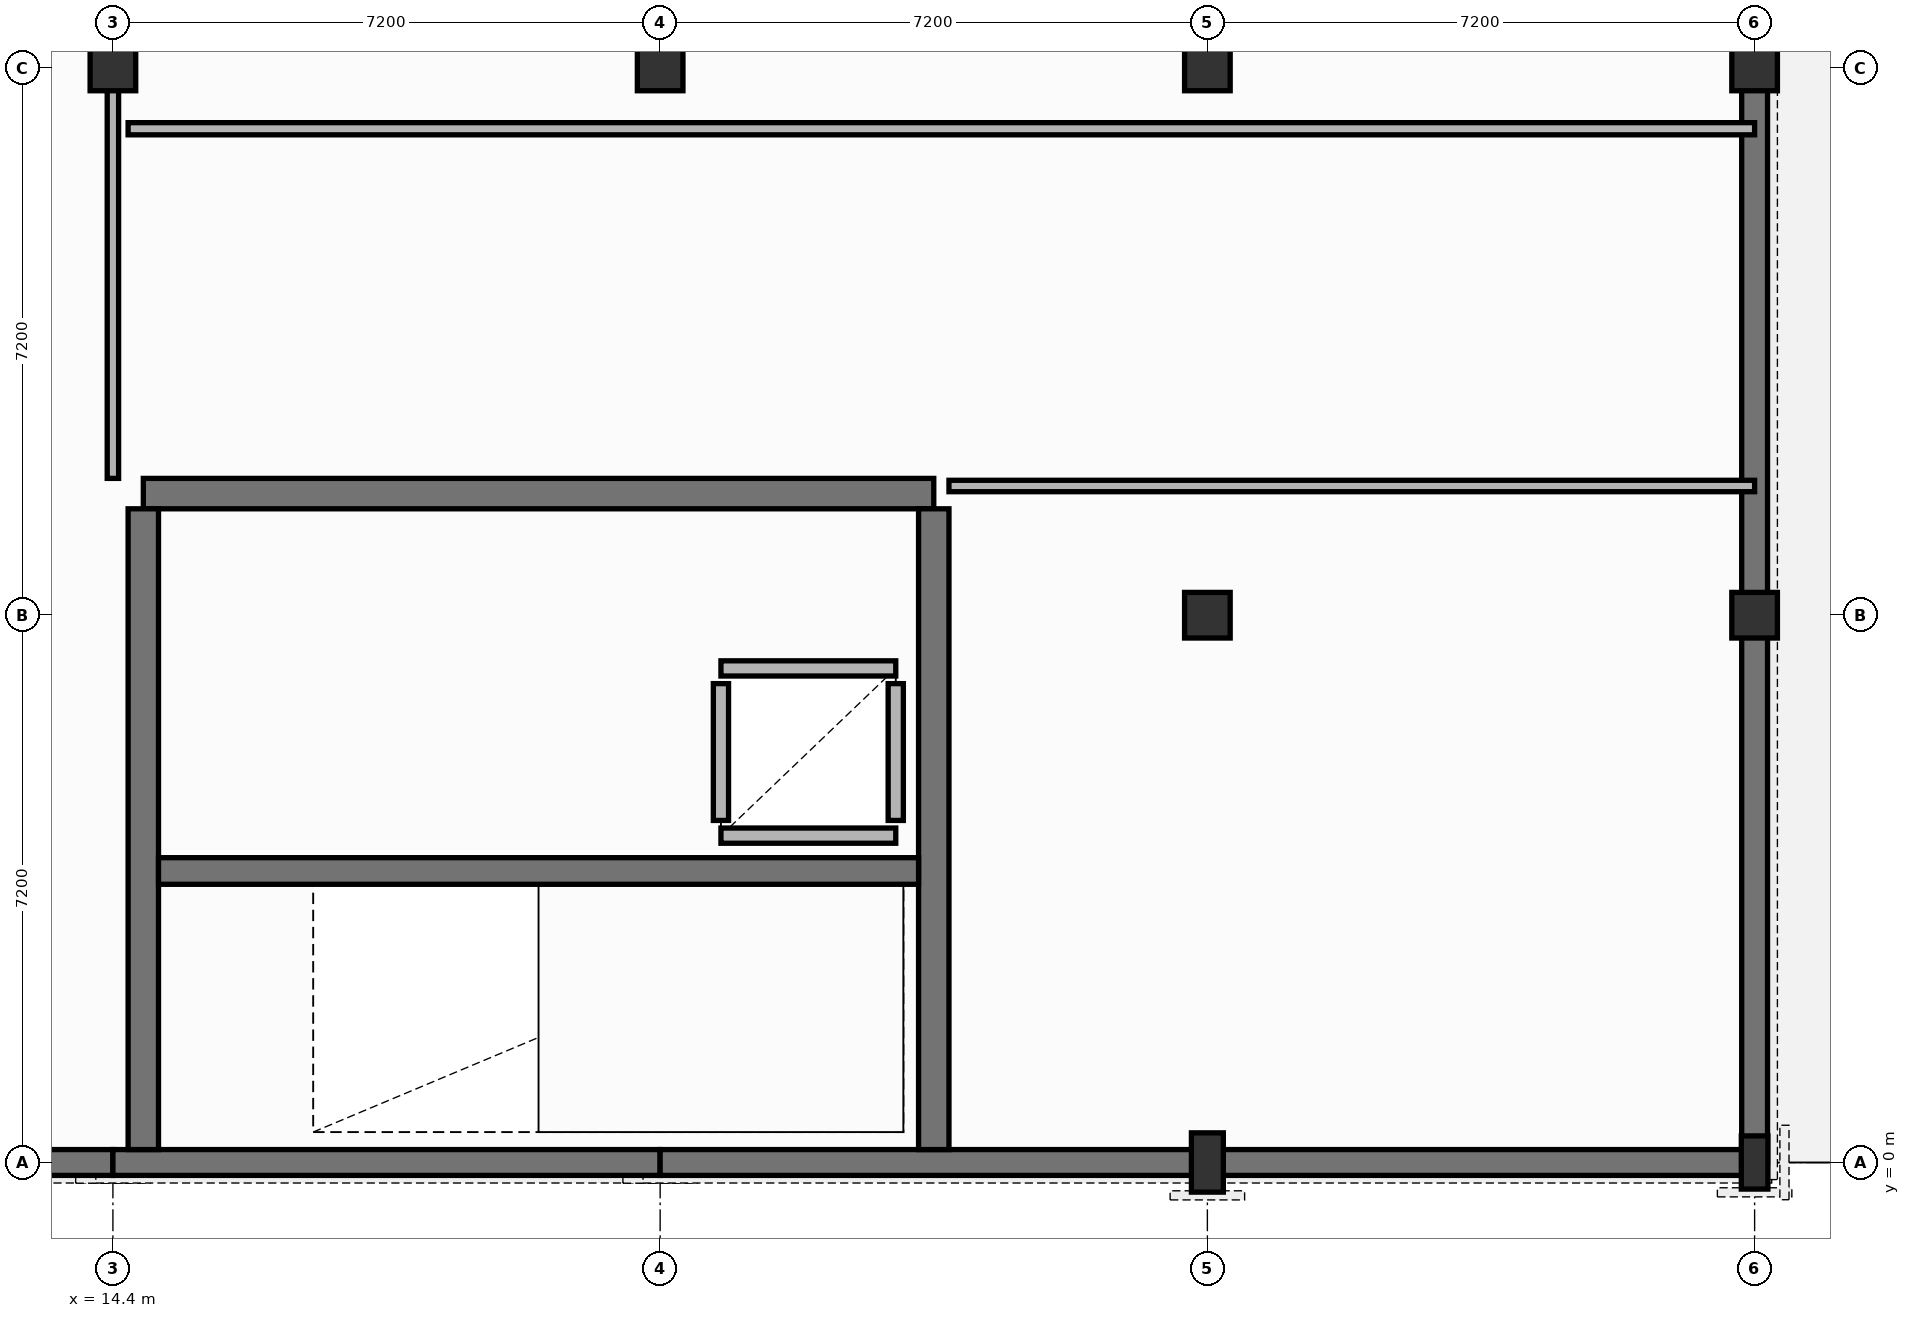
"""IFC4 building model, lengths in metres.
Left out: names, types, materials, properties, quantities, classifications, styles, units other than length and angle.
Written with IfcOpenShell. Run it as: python <this file> out.ifc"""

import sys

from ifc_helpers import new_model, si_unit, direction, frame, frame_2d, origin, origin_2d, place, context, subcontext, project, spatial, rectangle, extrude, element, fill, save


model = new_model("IFC4")
c1 = context("Model", 3, precision=1e-05, world=origin(), true_north=direction((0.0, 1.0)))
c2 = subcontext(c1, "Body", "Model", "MODEL_VIEW")
j1 = project(units=[si_unit("LENGTHUNIT", "METRE"), si_unit("PLANEANGLEUNIT", "RADIAN")], contexts=[c1])
p1 = place(None, origin())
s1 = spatial("IfcSite", under=j1, at=p1, CompositionType="ELEMENT")
p2 = place(p1, origin())
s2 = spatial("IfcBuilding", under=s1, at=p2, CompositionType="ELEMENT")
p3 = place(p2, frame((0.0, 0.0, 8.94)))
s3 = spatial("IfcBuildingStorey", under=s2, at=p3, CompositionType="ELEMENT", Elevation=8.94)
for number, where, z_axis, x_axis in (
    (1, (14.4, 14.4, 0.0), (0.0, 0.0, 1.0), (1.0, 0.0, 0.0)),
    (2, (21.6, 14.4, 0.0), (0.0, 0.0, 1.0), (1.0, 0.0, 0.0)),
):
    element("IfcColumn", number, at=place(p3, frame(where, z_axis=z_axis, x_axis=x_axis)), inside=s3, PredefinedType="COLUMN", context=c2, shape_type="SweptSolid", body=[
        extrude(rectangle(XDim=0.6, YDim=0.6, at=origin_2d()), origin(), (0.0, 0.0, 1.0), 3.84),
    ])
p4 = place(p3, frame((28.8, 0.0, 0.0), z_axis=(0.0, 0.0, 1.0), x_axis=(0.0, 1.0, 0.0)))
e3 = element("IfcColumn", 3, at=p4, inside=s3, PredefinedType="PILASTER", context=c2, shape_type="SweptSolid", body=[
    extrude(rectangle(XDim=0.42, YDim=0.78, at=origin_2d()), origin(), (0.0, 0.0, 1.0), 3.84),
])
for number, where, z_axis, x_axis in (
    (4, (28.8, 7.2, 0.0), (0.0, 0.0, 1.0), (1.0, 0.0, 0.0)),
    (5, (28.8, 14.4, 0.0), (0.0, 0.0, 1.0), (1.0, 0.0, 0.0)),
):
    element("IfcColumn", number, at=place(p3, frame(where, z_axis=z_axis, x_axis=x_axis)), inside=s3, PredefinedType="COLUMN", context=c2, shape_type="SweptSolid", body=[
        extrude(rectangle(XDim=0.6, YDim=0.6, at=origin_2d()), origin(), (0.0, 0.0, 1.0), 3.84),
    ])
p5 = place(p3, frame((36.0, 0.0, 0.0), z_axis=(0.0, 0.0, 1.0), x_axis=(0.0, 1.0, 0.0)))
e6 = element("IfcColumn", 6, at=p5, inside=s3, PredefinedType="PILASTER", context=c2, shape_type="SweptSolid", body=[
    extrude(rectangle(XDim=0.35, YDim=0.7, at=origin_2d()), origin(), (0.0, 0.0, 1.0), 3.84),
])
for number, where, z_axis, x_axis in (
    (7, (36.0, 7.2, 0.0), (0.0, 0.0, 1.0), (1.0, 0.0, 0.0)),
    (8, (36.0, 14.4, 0.0), (0.0, 0.0, 1.0), (1.0, 0.0, 0.0)),
):
    element("IfcColumn", number, at=place(p3, frame(where, z_axis=z_axis, x_axis=x_axis)), inside=s3, PredefinedType="COLUMN", context=c2, shape_type="SweptSolid", body=[
        extrude(rectangle(XDim=0.6, YDim=0.6, at=origin_2d()), origin(), (0.0, 0.0, 1.0), 3.84),
    ])
p6 = place(p3, frame((7.2, 0.0, 0.0), z_axis=(0.0, 0.0, 1.0), x_axis=(1.0, 0.0, 0.0)))
e9 = element("IfcWall", 9, at=p6, inside=s3, PredefinedType="SOLIDWALL", context=c2, shape_type="SweptSolid", body=[
    extrude(rectangle(XDim=7.2, YDim=0.34, at=frame_2d((3.6, 0.0))), origin(), (0.0, 0.0, 1.0), 3.53),
])
p7 = place(p6, frame((2.0, 0.0, 0.85)))
e10 = element("IfcOpeningElement", 10, at=p7, cuts=e9, PredefinedType="OPENING", context=c2, shape_type="SweptSolid", body=[
    extrude(rectangle(XDim=2.4, YDim=2.4, at=frame_2d((1.2, 1.2))), frame((0.0, 0.18, 0.0), z_axis=(0.0, -1.0, 0.0), x_axis=(1.0, 0.0, 0.0)), (0.0, 0.0, 1.0), 0.36),
])
p8 = place(p3, frame((14.4, 0.0, 0.0), z_axis=(0.0, 0.0, 1.0), x_axis=(1.0, 0.0, 0.0)))
e11 = element("IfcWall", 11, at=p8, inside=s3, PredefinedType="SOLIDWALL", context=c2, shape_type="SweptSolid", body=[
    extrude(rectangle(XDim=7.2, YDim=0.34, at=frame_2d((3.6, 0.0))), origin(), (0.0, 0.0, 1.0), 3.53),
])
p9 = place(p8, frame((5.2, 0.0, 1.05)))
e12 = element("IfcOpeningElement", 12, at=p9, cuts=e11, PredefinedType="OPENING", context=c2, shape_type="SweptSolid", body=[
    extrude(rectangle(XDim=1.05, YDim=1.75, at=frame_2d((0.525, 0.875))), frame((0.0, 0.18, 0.0), z_axis=(0.0, -1.0, 0.0), x_axis=(1.0, 0.0, 0.0)), (0.0, 0.0, 1.0), 0.36),
])
p10 = place(p3, frame((21.6, 0.0, 0.0), z_axis=(0.0, 0.0, 1.0), x_axis=(1.0, 0.0, 0.0)))
e13 = element("IfcWall", 13, at=p10, inside=s3, PredefinedType="SOLIDWALL", context=c2, shape_type="SweptSolid", body=[
    extrude(rectangle(XDim=7.2, YDim=0.34, at=frame_2d((3.6, 0.0))), origin(), (0.0, 0.0, 1.0), 3.53),
])
p11 = place(p10, frame((5.2, 0.0, 1.05)))
e14 = element("IfcOpeningElement", 14, at=p11, cuts=e13, PredefinedType="OPENING", context=c2, shape_type="SweptSolid", body=[
    extrude(rectangle(XDim=1.05, YDim=1.75, at=frame_2d((0.525, 0.875))), frame((0.0, 0.18, 0.0), z_axis=(0.0, -1.0, 0.0), x_axis=(1.0, 0.0, 0.0)), (0.0, 0.0, 1.0), 0.36),
])
p12 = place(p3, frame((28.8, 0.0, 0.0), z_axis=(0.0, 0.0, 1.0), x_axis=(1.0, 0.0, 0.0)))
e15 = element("IfcWall", 15, at=p12, inside=s3, PredefinedType="SOLIDWALL", context=c2, shape_type="SweptSolid", body=[
    extrude(rectangle(XDim=7.2, YDim=0.34, at=frame_2d((3.6, 0.0))), origin(), (0.0, 0.0, 1.0), 3.53),
])
p13 = place(p12, frame((2.0, 0.0, 0.355)))
e16 = element("IfcOpeningElement", 16, at=p13, cuts=e15, PredefinedType="OPENING", context=c2, shape_type="SweptSolid", body=[
    extrude(rectangle(XDim=2.4, YDim=2.4, at=frame_2d((1.2, 1.2))), frame((0.0, 0.18, 0.0), z_axis=(0.0, -1.0, 0.0), x_axis=(1.0, 0.0, 0.0)), (0.0, 0.0, 1.0), 0.36),
])
p14 = place(p3, frame((36.0, 0.0, 0.0), z_axis=(0.0, 0.0, 1.0), x_axis=(0.0, 1.0, 0.0)))
e17 = element("IfcWall", 17, at=p14, inside=s3, PredefinedType="SOLIDWALL", context=c2, shape_type="SweptSolid", body=[
    extrude(rectangle(XDim=21.6, YDim=0.34, at=frame_2d((10.8, 0.0))), origin(), (0.0, 0.0, 1.0), 3.53),
])
p15 = place(p14, frame((10.2, 0.0, 0.0)))
e18 = element("IfcOpeningElement", 18, at=p15, cuts=e17, PredefinedType="OPENING", context=c2, shape_type="SweptSolid", body=[
    extrude(rectangle(XDim=1.05, YDim=2.2, at=frame_2d((0.525, 1.1))), frame((0.0, 0.18, 0.0), z_axis=(0.0, -1.0, 0.0), x_axis=(1.0, 0.0, 0.0)), (0.0, 0.0, 1.0), 0.36),
])
p16 = place(p14, frame((2.8, 0.0, 0.9)))
e19 = element("IfcOpeningElement", 19, at=p16, cuts=e17, PredefinedType="OPENING", context=c2, shape_type="SweptSolid", body=[
    extrude(rectangle(XDim=2.3, YDim=1.7, at=frame_2d((1.15, 0.85))), frame((0.0, 0.18, 0.0), z_axis=(0.0, -1.0, 0.0), x_axis=(1.0, 0.0, 0.0)), (0.0, 0.0, 1.0), 0.36),
])
p17 = place(p14, frame((15.2, 0.0, 0.705)))
e20 = element("IfcOpeningElement", 20, at=p17, cuts=e17, PredefinedType="OPENING", context=c2, shape_type="SweptSolid", body=[
    extrude(rectangle(XDim=1.6, YDim=2.05, at=frame_2d((0.8, 1.025))), frame((0.0, 0.18, 0.0), z_axis=(0.0, -1.0, 0.0), x_axis=(1.0, 0.0, 0.0)), (0.0, 0.0, 1.0), 0.36),
])
p18 = place(p3, frame((14.8, 8.8, 0.0), z_axis=(0.0, 0.0, 1.0), x_axis=(1.0, 0.0, 0.0)))
e21 = element("IfcWall", 21, at=p18, inside=s3, PredefinedType="SHEAR", context=c2, shape_type="SweptSolid", body=[
    extrude(rectangle(XDim=10.4, YDim=0.4, at=frame_2d((5.2, 0.0))), origin(), (0.0, 0.0, 1.0), 3.53),
])
p19 = place(p18, frame((2.4, 0.0, 0.0)))
e22 = element("IfcOpeningElement", 22, at=p19, cuts=e21, PredefinedType="OPENING", context=c2, shape_type="SweptSolid", body=[
    extrude(rectangle(XDim=1.5, YDim=2.2, at=frame_2d((0.75, 1.1))), frame((0.0, 0.21, 0.0), z_axis=(0.0, -1.0, 0.0), x_axis=(1.0, 0.0, 0.0)), (0.0, 0.0, 1.0), 0.42),
])
for number, where, z_axis, x_axis in (
    (23, (14.8, 0.17, 0.0), (0.0, 0.0, 1.0), (0.0, 1.0, 0.0)),
    (24, (25.2, 0.17, 0.0), (0.0, 0.0, 1.0), (0.0, 1.0, 0.0)),
):
    element("IfcWall", number, at=place(p3, frame(where, z_axis=z_axis, x_axis=x_axis)), inside=s3, PredefinedType="SHEAR", context=c2, shape_type="SweptSolid", body=[
        extrude(rectangle(XDim=8.43, YDim=0.4, at=frame_2d((4.215, 0.0))), origin(), (0.0, 0.0, 1.0), 3.53),
    ])
p20 = place(p3, frame((15.0, 3.835, 0.0), z_axis=(0.0, 0.0, 1.0), x_axis=(1.0, 0.0, 0.0)))
e25 = element("IfcWall", 25, at=p20, inside=s3, PredefinedType="SHEAR", context=c2, shape_type="SweptSolid", body=[
    extrude(rectangle(XDim=10.0, YDim=0.35, at=frame_2d((5.0, 0.0))), origin(), (0.0, 0.0, 1.0), 3.53),
])
p21 = place(p20, frame((0.45, 0.0, 0.0)))
e26 = element("IfcOpeningElement", 26, at=p21, cuts=e25, PredefinedType="OPENING", context=c2, shape_type="SweptSolid", body=[
    extrude(rectangle(XDim=1.05, YDim=2.2, at=frame_2d((0.525, 1.1))), frame((0.0, 0.185, 0.0), z_axis=(0.0, -1.0, 0.0), x_axis=(1.0, 0.0, 0.0)), (0.0, 0.0, 1.0), 0.37),
])
for number, where, z_axis, x_axis in (
    (27, (22.4, 4.3, 0.0), (0.0, 0.0, 1.0), (1.0, 0.0, 0.0)),
    (28, (22.4, 6.5, 0.0), (0.0, 0.0, 1.0), (1.0, 0.0, 0.0)),
):
    element("IfcWall", number, at=place(p3, frame(where, z_axis=z_axis, x_axis=x_axis)), inside=s3, PredefinedType="PARTITIONING", context=c2, shape_type="SweptSolid", body=[
        extrude(rectangle(XDim=2.3, YDim=0.2, at=frame_2d((1.15, 0.0))), origin(), (0.0, 0.0, 1.0), 3.53),
    ])
p22 = place(p3, frame((22.4, 4.5, 0.0), z_axis=(0.0, 0.0, 1.0), x_axis=(0.0, 1.0, 0.0)))
e29 = element("IfcWall", 29, at=p22, inside=s3, PredefinedType="PARTITIONING", context=c2, shape_type="SweptSolid", body=[
    extrude(rectangle(XDim=1.8, YDim=0.2, at=frame_2d((0.9, 0.0))), origin(), (0.0, 0.0, 1.0), 3.53),
])
p23 = place(p22, frame((0.45, 0.0, 0.0)))
e30 = element("IfcOpeningElement", 30, at=p23, cuts=e29, PredefinedType="OPENING", context=c2, shape_type="SweptSolid", body=[
    extrude(rectangle(XDim=0.9, YDim=2.1, at=frame_2d((0.45, 1.05))), frame((0.0, 0.11, 0.0), z_axis=(0.0, -1.0, 0.0), x_axis=(1.0, 0.0, 0.0)), (0.0, 0.0, 1.0), 0.22),
])
p24 = place(p3, frame((24.7, 4.5, 0.0), z_axis=(0.0, 0.0, 1.0), x_axis=(0.0, 1.0, 0.0)))
e31 = element("IfcWall", 31, at=p24, inside=s3, PredefinedType="PARTITIONING", context=c2, shape_type="SweptSolid", body=[
    extrude(rectangle(XDim=1.8, YDim=0.2, at=frame_2d((0.9, 0.0))), origin(), (0.0, 0.0, 1.0), 3.53),
])
p25 = place(p3, frame((14.4, 9.0, 0.0), z_axis=(0.0, 0.0, 1.0), x_axis=(0.0, 1.0, 0.0)))
e32 = element("IfcWall", 32, at=p25, inside=s3, PredefinedType="PARTITIONING", context=c2, shape_type="SweptSolid", body=[
    extrude(rectangle(XDim=12.6, YDim=0.15, at=frame_2d((6.3, 0.0))), origin(), (0.0, 0.0, 1.0), 2.755),
])
p26 = place(p25, frame((8.2, 0.0, 0.0)))
e33 = element("IfcOpeningElement", 33, at=p26, cuts=e32, PredefinedType="OPENING", context=c2, shape_type="SweptSolid", body=[
    extrude(rectangle(XDim=1.6, YDim=2.2, at=frame_2d((0.8, 1.1))), frame((0.0, 0.085, 0.0), z_axis=(0.0, -1.0, 0.0), x_axis=(1.0, 0.0, 0.0)), (0.0, 0.0, 1.0), 0.17),
])
p27 = place(p3, frame((14.6, 13.6, 0.0), z_axis=(0.0, 0.0, 1.0), x_axis=(1.0, 0.0, 0.0)))
e34 = element("IfcWall", 34, at=p27, inside=s3, PredefinedType="PARTITIONING", context=c2, shape_type="SweptSolid", body=[
    extrude(rectangle(XDim=21.4, YDim=0.16, at=frame_2d((10.7, 0.0))), origin(), (0.0, 0.0, 1.0), 3.53),
])
p28 = place(p27, frame((2.8, 0.0, 0.0)))
e35 = element("IfcOpeningElement", 35, at=p28, cuts=e34, PredefinedType="OPENING", context=c2, shape_type="SweptSolid", body=[
    extrude(rectangle(XDim=1.6, YDim=2.2, at=frame_2d((0.8, 1.1))), frame((0.0, 0.09, 0.0), z_axis=(0.0, -1.0, 0.0), x_axis=(1.0, 0.0, 0.0)), (0.0, 0.0, 1.0), 0.18),
])
p29 = place(p3, frame((25.4, 8.9, 0.0), z_axis=(0.0, 0.0, 1.0), x_axis=(1.0, 0.0, 0.0)))
e36 = element("IfcWall", 36, at=p29, inside=s3, PredefinedType="PARTITIONING", context=c2, shape_type="SweptSolid", body=[
    extrude(rectangle(XDim=10.6, YDim=0.15, at=frame_2d((5.3, 0.0))), origin(), (0.0, 0.0, 1.0), 3.53),
])
p30 = place(p29, frame((4.2, 0.0, 0.0)))
e37 = element("IfcOpeningElement", 37, at=p30, cuts=e36, PredefinedType="OPENING", context=c2, shape_type="SweptSolid", body=[
    extrude(rectangle(XDim=1.0, YDim=2.15, at=frame_2d((0.5, 1.075))), frame((0.0, 0.085, 0.0), z_axis=(0.0, -1.0, 0.0), x_axis=(1.0, 0.0, 0.0)), (0.0, 0.0, 1.0), 0.17),
])
p31 = place(p9, origin())
e38 = element("IfcWindow", 38, at=p31, inside=s3, PartitioningType="SINGLE_PANEL", PredefinedType="WINDOW", context=c2, shape_type="SweptSolid", body=[
    extrude(rectangle(XDim=1.05, YDim=1.75, at=frame_2d((0.525, 0.875))), frame((0.0, 0.03, 0.0), z_axis=(0.0, -1.0, 0.0), x_axis=(1.0, 0.0, 0.0)), (0.0, 0.0, 1.0), 0.06),
])
fill(e12, e38)
p32 = place(p11, origin())
e39 = element("IfcWindow", 39, at=p32, inside=s3, PartitioningType="SINGLE_PANEL", PredefinedType="WINDOW", context=c2, shape_type="SweptSolid", body=[
    extrude(rectangle(XDim=1.05, YDim=1.75, at=frame_2d((0.525, 0.875))), frame((0.0, 0.03, 0.0), z_axis=(0.0, -1.0, 0.0), x_axis=(1.0, 0.0, 0.0)), (0.0, 0.0, 1.0), 0.06),
])
fill(e14, e39)
p33 = place(p13, origin())
e40 = element("IfcWindow", 40, at=p33, inside=s3, PartitioningType="SINGLE_PANEL", PredefinedType="WINDOW", context=c2, shape_type="SweptSolid", body=[
    extrude(rectangle(XDim=2.4, YDim=2.4, at=frame_2d((1.2, 1.2))), frame((0.0, 0.03, 0.0), z_axis=(0.0, -1.0, 0.0), x_axis=(1.0, 0.0, 0.0)), (0.0, 0.0, 1.0), 0.06),
])
fill(e16, e40)
p34 = place(p15, frame((1.05, 0.0, 0.0), z_axis=(0.0, 0.0, 1.0), x_axis=(-1.0, 0.0, 0.0)))
e41 = element("IfcDoor", 41, at=p34, inside=s3, OperationType="SINGLE_SWING_LEFT", PredefinedType="DOOR", context=c2, shape_type="SweptSolid", body=[
    extrude(rectangle(XDim=1.05, YDim=2.2, at=frame_2d((0.525, 1.1))), frame((0.0, 0.025, 0.0), z_axis=(0.0, -1.0, 0.0), x_axis=(1.0, 0.0, 0.0)), (0.0, 0.0, 1.0), 0.05),
])
fill(e18, e41)
p35 = place(p16, origin())
e42 = element("IfcWindow", 42, at=p35, inside=s3, PartitioningType="SINGLE_PANEL", PredefinedType="WINDOW", context=c2, shape_type="SweptSolid", body=[
    extrude(rectangle(XDim=2.3, YDim=1.7, at=frame_2d((1.15, 0.85))), frame((0.0, 0.03, 0.0), z_axis=(0.0, -1.0, 0.0), x_axis=(1.0, 0.0, 0.0)), (0.0, 0.0, 1.0), 0.06),
])
fill(e19, e42)
p36 = place(p19, origin())
e43 = element("IfcDoor", 43, at=p36, inside=s3, OperationType="DOUBLE_DOOR_SINGLE_SWING", PredefinedType="DOOR", context=c2, shape_type="SweptSolid", body=[
    extrude(rectangle(XDim=1.5, YDim=2.2, at=frame_2d((0.75, 1.1))), frame((0.0, 0.025, 0.0), z_axis=(0.0, -1.0, 0.0), x_axis=(1.0, 0.0, 0.0)), (0.0, 0.0, 1.0), 0.05),
])
fill(e22, e43)
p37 = place(p21, origin())
e44 = element("IfcDoor", 44, at=p37, inside=s3, OperationType="SINGLE_SWING_LEFT", PredefinedType="DOOR", context=c2, shape_type="SweptSolid", body=[
    extrude(rectangle(XDim=1.05, YDim=2.2, at=frame_2d((0.525, 1.1))), frame((0.0, 0.025, 0.0), z_axis=(0.0, -1.0, 0.0), x_axis=(1.0, 0.0, 0.0)), (0.0, 0.0, 1.0), 0.05),
])
fill(e26, e44)
p38 = place(p23, origin())
e45 = element("IfcDoor", 45, at=p38, inside=s3, OperationType="SINGLE_SWING_LEFT", PredefinedType="DOOR", context=c2, shape_type="SweptSolid", body=[
    extrude(rectangle(XDim=0.9, YDim=2.1, at=frame_2d((0.45, 1.05))), frame((0.0, 0.025, 0.0), z_axis=(0.0, -1.0, 0.0), x_axis=(1.0, 0.0, 0.0)), (0.0, 0.0, 1.0), 0.05),
])
fill(e30, e45)
p39 = place(p28, origin())
e46 = element("IfcDoor", 46, at=p39, inside=s3, OperationType="DOUBLE_DOOR_SINGLE_SWING", PredefinedType="DOOR", context=c2, shape_type="SweptSolid", body=[
    extrude(rectangle(XDim=1.6, YDim=2.2, at=frame_2d((0.8, 1.1))), frame((0.0, 0.025, 0.0), z_axis=(0.0, -1.0, 0.0), x_axis=(1.0, 0.0, 0.0)), (0.0, 0.0, 1.0), 0.05),
])
fill(e35, e46)
p40 = place(p30, origin())
e47 = element("IfcDoor", 47, at=p40, inside=s3, OperationType="SINGLE_SWING_LEFT", PredefinedType="DOOR", context=c2, shape_type="SweptSolid", body=[
    extrude(rectangle(XDim=1.0, YDim=2.15, at=frame_2d((0.5, 1.075))), frame((0.0, 0.025, 0.0), z_axis=(0.0, -1.0, 0.0), x_axis=(1.0, 0.0, 0.0)), (0.0, 0.0, 1.0), 0.05),
])
fill(e37, e47)
save(model, sys.argv[1])
